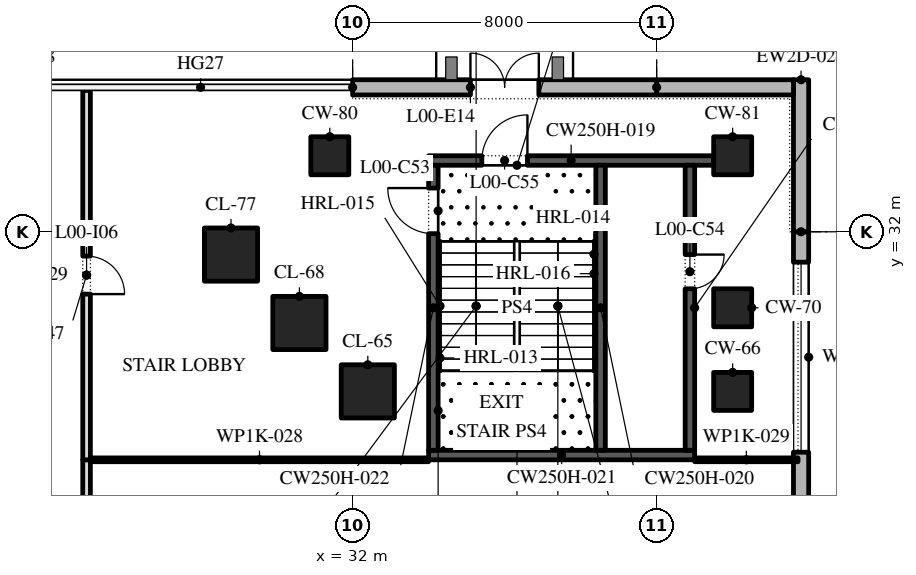
"""IFC4 building model, lengths in metres.
Left out: names, types, materials, properties, quantities, classifications, styles, units other than length and angle.
Written with IfcOpenShell. Run it as: python <this file> out.ifc"""

import sys

from ifc_helpers import new_model, si_unit, direction, frame, frame_2d, origin, origin_2d, place, context, subcontext, project, spatial, polyline, rectangle, outline, extrude, element, fill, save


model = new_model("IFC4")
c1 = context("Model", 3, precision=1e-05, world=origin(), true_north=direction((0.0, 1.0)))
c2 = subcontext(c1, "Body", "Model", "MODEL_VIEW")
j1 = project(units=[si_unit("LENGTHUNIT", "METRE"), si_unit("PLANEANGLEUNIT", "RADIAN")], contexts=[c1])
p1 = place(None, origin())
s1 = spatial("IfcSite", under=j1, at=p1, CompositionType="ELEMENT")
p2 = place(p1, origin())
s2 = spatial("IfcBuilding", under=s1, at=p2, CompositionType="ELEMENT")
p3 = place(p2, origin())
s3 = spatial("IfcBuildingStorey", under=s2, at=p3, CompositionType="ELEMENT", Elevation=0.0)
p4 = place(p3, frame((32.4, 27.8, 0.0), z_axis=(0.0, 0.0, 1.0), x_axis=(1.0, 0.0, 0.0)))
e1 = element("IfcColumn", 1, at=p4, inside=s3, PredefinedType="COLUMN", context=c2, shape_type="SweptSolid", body=[
    extrude(rectangle(XDim=1.4, YDim=1.4, at=origin_2d()), origin(), (0.0, 0.0, 1.0), 8.0),
])
p5 = place(p3, frame((42.0, 27.8, 0.0), z_axis=(0.0, 0.0, 1.0), x_axis=(1.0, 0.0, 0.0)))
e2 = element("IfcColumn", 2, at=p5, inside=s3, PredefinedType="COLUMN", context=c2, shape_type="SweptSolid", body=[
    extrude(rectangle(XDim=1.0, YDim=1.0, at=origin_2d()), origin(), (0.0, 0.0, 1.0), 8.0),
])
p6 = place(p3, frame((30.6, 29.6, 0.0), z_axis=(0.0, 0.0, 1.0), x_axis=(1.0, 0.0, 0.0)))
e3 = element("IfcColumn", 3, at=p6, inside=s3, PredefinedType="COLUMN", context=c2, shape_type="SweptSolid", body=[
    extrude(rectangle(XDim=1.4, YDim=1.4, at=origin_2d()), origin(), (0.0, 0.0, 1.0), 8.0),
])
p7 = place(p3, frame((42.0, 30.0, 0.0), z_axis=(0.0, 0.0, 1.0), x_axis=(1.0, 0.0, 0.0)))
e4 = element("IfcColumn", 4, at=p7, inside=s3, PredefinedType="COLUMN", context=c2, shape_type="SweptSolid", body=[
    extrude(rectangle(XDim=1.0, YDim=1.0, at=origin_2d()), origin(), (0.0, 0.0, 1.0), 8.0),
])
p8 = place(p3, frame((28.8, 31.4, 0.0), z_axis=(0.0, 0.0, 1.0), x_axis=(1.0, 0.0, 0.0)))
e5 = element("IfcColumn", 5, at=p8, inside=s3, PredefinedType="COLUMN", context=c2, shape_type="SweptSolid", body=[
    extrude(rectangle(XDim=1.4, YDim=1.4, at=origin_2d()), origin(), (0.0, 0.0, 1.0), 8.0),
])
for number, where, z_axis, x_axis in (
    (6, (31.4, 34.0, 0.0), (0.0, 0.0, 1.0), (1.0, 0.0, 0.0)),
    (7, (42.0, 34.0, 0.0), (0.0, 0.0, 1.0), (1.0, 0.0, 0.0)),
):
    element("IfcColumn", number, at=place(p3, frame(where, z_axis=z_axis, x_axis=x_axis)), inside=s3, PredefinedType="COLUMN", context=c2, shape_type="SweptSolid", body=[
        extrude(rectangle(XDim=1.0, YDim=1.0, at=origin_2d()), origin(), (0.0, 0.0, 1.0), 8.0),
    ])
p9 = place(p3, frame((43.8, 24.0, 0.0), z_axis=(0.0, 0.0, 1.0), x_axis=(0.0, 1.0, 0.0)))
e8 = element("IfcWall", 8, at=p9, inside=s3, PredefinedType="STANDARD", context=c2, shape_type="SweptSolid", body=[
    extrude(rectangle(XDim=8.0, YDim=0.4, at=frame_2d((4.0, 0.0))), origin(), (0.0, 0.0, 1.0), 7.7),
])
p10 = place(p9, frame((2.2, 0.0, 0.5)))
e9 = element("IfcOpeningElement", 9, at=p10, cuts=e8, PredefinedType="OPENING", context=c2, shape_type="SweptSolid", body=[
    extrude(outline(polyline([(0.0, 0.0), (5.0, 0.0), (5.0, 3.35), (4.955, 3.907), (4.822, 4.451), (4.604, 4.966), (4.306, 5.44), (3.937, 5.86), (3.505, 6.216), (3.022, 6.498), (2.5, 6.7), (1.978, 6.498), (1.495, 6.216), (1.063, 5.86), (0.694, 5.44), (0.396, 4.966), (0.178, 4.451), (0.045, 3.907), (0.0, 3.35), (0.0, 0.0)])), frame((0.0, 0.21, 0.0), z_axis=(0.0, -1.0, 0.0), x_axis=(1.0, 0.0, 0.0)), (0.0, 0.0, 1.0), 0.42),
])
p11 = place(p3, frame((43.8, 32.0, 0.0), z_axis=(0.0, 0.0, 1.0), x_axis=(0.0, 1.0, 0.0)))
e10 = element("IfcWall", 10, at=p11, inside=s3, PredefinedType="STANDARD", context=c2, shape_type="SweptSolid", body=[
    extrude(rectangle(XDim=4.0, YDim=0.4, at=frame_2d((2.0, 0.0))), origin(), (0.0, 0.0, 1.0), 7.7),
])
p12 = place(p3, frame((43.6, 35.8, 0.0), z_axis=(0.0, 0.0, 1.0), x_axis=(-1.0, 0.0, 0.0)))
e11 = element("IfcWall", 11, at=p12, inside=s3, PredefinedType="STANDARD", context=c2, shape_type="SweptSolid", body=[
    extrude(rectangle(XDim=3.6, YDim=0.4, at=frame_2d((1.8, 0.0))), origin(), (0.0, 0.0, 1.0), 7.7),
])
p13 = place(p3, frame((40.0, 35.8, 0.0), z_axis=(0.0, 0.0, 1.0), x_axis=(-1.0, 0.0, 0.0)))
e12 = element("IfcWall", 12, at=p13, inside=s3, PredefinedType="STANDARD", context=c2, shape_type="SweptSolid", body=[
    extrude(rectangle(XDim=8.0, YDim=0.4, at=frame_2d((4.0, 0.0))), origin(), (0.0, 0.0, 1.0), 7.7),
])
p14 = place(p13, frame((3.1, 0.0, 0.0)))
e13 = element("IfcOpeningElement", 13, at=p14, cuts=e12, PredefinedType="OPENING", context=c2, shape_type="SweptSolid", body=[
    extrude(rectangle(XDim=1.8, YDim=2.7, at=frame_2d((0.9, 1.35))), frame((0.0, 0.21, 0.0), z_axis=(0.0, -1.0, 0.0), x_axis=(1.0, 0.0, 0.0)), (0.0, 0.0, 1.0), 0.42),
])
p15 = place(p3, frame((34.0, 26.125, 0.0), z_axis=(0.0, 0.0, 1.0), x_axis=(1.0, 0.0, 0.0)))
e14 = element("IfcWall", 14, at=p15, inside=s3, PredefinedType="SHEAR", context=c2, shape_type="SweptSolid", body=[
    extrude(rectangle(XDim=7.0, YDim=0.25, at=frame_2d((3.5, 0.0))), origin(), (0.0, 0.0, 1.0), 7.7),
])
p16 = place(p3, frame((34.0, 33.875, 0.0), z_axis=(0.0, 0.0, 1.0), x_axis=(1.0, 0.0, 0.0)))
e15 = element("IfcWall", 15, at=p16, inside=s3, PredefinedType="SHEAR", context=c2, shape_type="SweptSolid", body=[
    extrude(rectangle(XDim=7.5, YDim=0.25, at=frame_2d((3.75, 0.0))), origin(), (0.0, 0.0, 1.0), 7.7),
])
p17 = place(p16, frame((1.4, 0.0, 0.0)))
e16 = element("IfcOpeningElement", 16, at=p17, cuts=e15, PredefinedType="OPENING", context=c2, shape_type="SweptSolid", body=[
    extrude(rectangle(XDim=1.2, YDim=2.1, at=frame_2d((0.6, 1.05))), frame((0.0, 0.135, 0.0), z_axis=(0.0, -1.0, 0.0), x_axis=(1.0, 0.0, 0.0)), (0.0, 0.0, 1.0), 0.27),
])
p18 = place(p3, frame((34.125, 26.25, 0.0), z_axis=(0.0, 0.0, 1.0), x_axis=(0.0, 1.0, 0.0)))
e17 = element("IfcWall", 17, at=p18, inside=s3, PredefinedType="SHEAR", context=c2, shape_type="SweptSolid", body=[
    extrude(rectangle(XDim=7.5, YDim=0.25, at=frame_2d((3.75, 0.0))), origin(), (0.0, 0.0, 1.0), 7.7),
])
p19 = place(p18, frame((5.7, 0.0, 0.0)))
e18 = element("IfcOpeningElement", 18, at=p19, cuts=e17, PredefinedType="OPENING", context=c2, shape_type="SweptSolid", body=[
    extrude(rectangle(XDim=1.2, YDim=2.1, at=frame_2d((0.6, 1.05))), frame((0.0, 0.135, 0.0), z_axis=(0.0, -1.0, 0.0), x_axis=(1.0, 0.0, 0.0)), (0.0, 0.0, 1.0), 0.27),
])
p20 = place(p3, frame((40.875, 26.25, 0.0), z_axis=(0.0, 0.0, 1.0), x_axis=(0.0, 1.0, 0.0)))
e19 = element("IfcWall", 19, at=p20, inside=s3, PredefinedType="SHEAR", context=c2, shape_type="SweptSolid", body=[
    extrude(rectangle(XDim=7.5, YDim=0.25, at=frame_2d((3.75, 0.0))), origin(), (0.0, 0.0, 1.0), 7.7),
])
p21 = place(p20, frame((4.25, 0.0, 0.0)))
e20 = element("IfcOpeningElement", 20, at=p21, cuts=e19, PredefinedType="OPENING", context=c2, shape_type="SweptSolid", body=[
    extrude(rectangle(XDim=0.9, YDim=2.1, at=frame_2d((0.45, 1.05))), frame((0.0, 0.135, 0.0), z_axis=(0.0, -1.0, 0.0), x_axis=(1.0, 0.0, 0.0)), (0.0, 0.0, 1.0), 0.27),
])
p22 = place(p3, frame((38.525, 26.25, 0.0), z_axis=(0.0, 0.0, 1.0), x_axis=(0.0, 1.0, 0.0)))
e21 = element("IfcWall", 21, at=p22, inside=s3, PredefinedType="SHEAR", context=c2, shape_type="SweptSolid", body=[
    extrude(rectangle(XDim=7.5, YDim=0.25, at=frame_2d((3.75, 0.0))), origin(), (0.0, 0.0, 1.0), 7.7),
])
p23 = place(p3, frame((25.1, 26.0, 0.0), z_axis=(0.0, 0.0, 1.0), x_axis=(1.0, 0.0, 0.0)))
e22 = element("IfcWall", 22, at=p23, inside=s3, PredefinedType="PARTITIONING", context=c2, shape_type="SweptSolid", body=[
    extrude(rectangle(XDim=8.9, YDim=0.1, at=frame_2d((4.45, 0.0))), origin(), (0.0, 0.0, 1.0), 7.7),
])
p24 = place(p3, frame((41.0, 26.0, 0.0), z_axis=(0.0, 0.0, 1.0), x_axis=(1.0, 0.0, 0.0)))
e23 = element("IfcWall", 23, at=p24, inside=s3, PredefinedType="PARTITIONING", context=c2, shape_type="SweptSolid", body=[
    extrude(rectangle(XDim=2.72, YDim=0.1, at=frame_2d((1.36, 0.0))), origin(), (0.0, 0.0, 1.0), 7.7),
])
p25 = place(p3, frame((25.0, 19.0, 0.0), z_axis=(0.0, 0.0, 1.0), x_axis=(0.0, 1.0, 0.0)))
e24 = element("IfcWall", 24, at=p25, inside=s3, PredefinedType="PARTITIONING", context=c2, shape_type="SweptSolid", body=[
    extrude(rectangle(XDim=7.0, YDim=0.2, at=frame_2d((3.5, 0.0))), origin(), (0.0, 0.0, 1.0), 7.7),
])
p26 = place(p25, frame((3.0, 0.0, 0.0)))
e25 = element("IfcOpeningElement", 25, at=p26, cuts=e24, PredefinedType="OPENING", context=c2, shape_type="SweptSolid", body=[
    extrude(rectangle(XDim=1.0, YDim=2.1, at=frame_2d((0.5, 1.05))), frame((0.0, 0.11, 0.0), z_axis=(0.0, -1.0, 0.0), x_axis=(1.0, 0.0, 0.0)), (0.0, 0.0, 1.0), 0.22),
])
p27 = place(p3, frame((25.0, 26.0, 0.0), z_axis=(0.0, 0.0, 1.0), x_axis=(0.0, 1.0, 0.0)))
e26 = element("IfcWall", 26, at=p27, inside=s3, PredefinedType="PARTITIONING", context=c2, shape_type="SweptSolid", body=[
    extrude(rectangle(XDim=9.72, YDim=0.2, at=frame_2d((4.86, 0.0))), origin(), (0.0, 0.0, 1.0), 7.7),
])
p28 = place(p27, frame((4.36, 0.0, 0.0)))
e27 = element("IfcOpeningElement", 27, at=p28, cuts=e26, PredefinedType="OPENING", context=c2, shape_type="SweptSolid", body=[
    extrude(rectangle(XDim=1.0, YDim=2.1, at=frame_2d((0.5, 1.05))), frame((0.0, 0.11, 0.0), z_axis=(0.0, -1.0, 0.0), x_axis=(1.0, 0.0, 0.0)), (0.0, 0.0, 1.0), 0.22),
])
p29 = place(p10, origin())
e28 = element("IfcWindow", 28, at=p29, inside=s3, PartitioningType="DOUBLE_PANEL_VERTICAL", PredefinedType="WINDOW", context=c2, shape_type="SweptSolid", body=[
    extrude(outline(polyline([(0.0, 0.0), (5.0, 0.0), (5.0, 3.35), (4.955, 3.907), (4.822, 4.451), (4.604, 4.966), (4.306, 5.44), (3.937, 5.86), (3.505, 6.216), (3.022, 6.498), (2.5, 6.7), (1.978, 6.498), (1.495, 6.216), (1.063, 5.86), (0.694, 5.44), (0.396, 4.966), (0.178, 4.451), (0.045, 3.907), (0.0, 3.35), (0.0, 0.0)])), frame((0.0, 0.03, 0.0), z_axis=(0.0, -1.0, 0.0), x_axis=(1.0, 0.0, 0.0)), (0.0, 0.0, 1.0), 0.06),
])
fill(e9, e28)
p30 = place(p14, frame((1.8, 0.0, 0.0), z_axis=(0.0, 0.0, 1.0), x_axis=(-1.0, 0.0, 0.0)))
e29 = element("IfcDoor", 29, at=p30, inside=s3, OperationType="DOUBLE_DOOR_SINGLE_SWING", PredefinedType="DOOR", context=c2, shape_type="SweptSolid", body=[
    extrude(rectangle(XDim=1.8, YDim=2.7, at=frame_2d((0.9, 1.35))), frame((0.0, 0.025, 0.0), z_axis=(0.0, -1.0, 0.0), x_axis=(1.0, 0.0, 0.0)), (0.0, 0.0, 1.0), 0.05),
])
fill(e13, e29)
p31 = place(p19, origin())
e30 = element("IfcDoor", 30, at=p31, inside=s3, OperationType="SINGLE_SWING_LEFT", PredefinedType="DOOR", context=c2, shape_type="SweptSolid", body=[
    extrude(rectangle(XDim=1.2, YDim=2.1, at=frame_2d((0.6, 1.05))), frame((0.0, 0.025, 0.0), z_axis=(0.0, -1.0, 0.0), x_axis=(1.0, 0.0, 0.0)), (0.0, 0.0, 1.0), 0.05),
])
fill(e18, e30)
p32 = place(p21, frame((0.9, 0.2, 0.0), z_axis=(0.0, 0.0, 1.0), x_axis=(-1.0, 0.0, 0.0)))
e31 = element("IfcDoor", 31, at=p32, inside=s3, OperationType="SINGLE_SWING_RIGHT", PredefinedType="DOOR", context=c2, shape_type="SweptSolid", body=[
    extrude(rectangle(XDim=0.9, YDim=2.1, at=frame_2d((0.45, 1.05))), frame((0.0, 0.125, 0.0), z_axis=(0.0, -1.0, 0.0), x_axis=(1.0, 0.0, 0.0)), (0.0, 0.0, 1.0), 0.05),
])
fill(e20, e31)
p33 = place(p17, origin())
e32 = element("IfcDoor", 32, at=p33, inside=s3, OperationType="SINGLE_SWING_LEFT", PredefinedType="DOOR", context=c2, shape_type="SweptSolid", body=[
    extrude(rectangle(XDim=1.2, YDim=2.1, at=frame_2d((0.6, 1.05))), frame((0.0, 0.025, 0.0), z_axis=(0.0, -1.0, 0.0), x_axis=(1.0, 0.0, 0.0)), (0.0, 0.0, 1.0), 0.05),
])
fill(e16, e32)
p34 = place(p28, frame((1.0, 0.0, 0.0), z_axis=(0.0, 0.0, 1.0), x_axis=(-1.0, 0.0, 0.0)))
e33 = element("IfcDoor", 33, at=p34, inside=s3, OperationType="SINGLE_SWING_LEFT", PredefinedType="DOOR", context=c2, shape_type="SweptSolid", body=[
    extrude(rectangle(XDim=1.0, YDim=2.1, at=frame_2d((0.5, 1.05))), frame((0.0, 0.025, 0.0), z_axis=(0.0, -1.0, 0.0), x_axis=(1.0, 0.0, 0.0)), (0.0, 0.0, 1.0), 0.05),
])
fill(e27, e33)
save(model, sys.argv[1])
